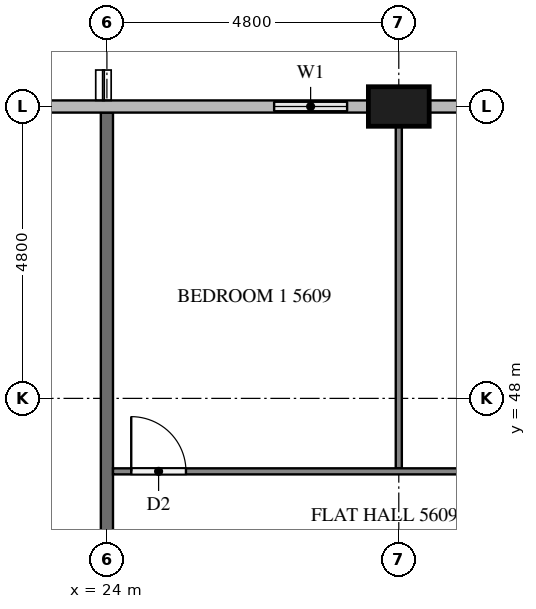
"""IFC4 building model, lengths in metres.
Left out: names, types, materials, properties, quantities, classifications, styles, units other than length and angle.
Written with IfcOpenShell. Run it as: python <this file> out.ifc"""

import sys

from ifc_helpers import new_model, si_unit, direction, frame, frame_2d, origin, origin_2d, place, context, subcontext, project, spatial, rectangle, extrude, element, fill, save


model = new_model("IFC4")
c1 = context("Model", 3, precision=1e-05, world=origin(), true_north=direction((0.0, 1.0)))
c2 = subcontext(c1, "Body", "Model", "MODEL_VIEW")
j1 = project(units=[si_unit("LENGTHUNIT", "METRE"), si_unit("PLANEANGLEUNIT", "RADIAN")], contexts=[c1])
p1 = place(None, origin())
s1 = spatial("IfcSite", under=j1, at=p1, CompositionType="ELEMENT")
p2 = place(p1, origin())
s2 = spatial("IfcBuilding", under=s1, at=p2, CompositionType="ELEMENT")
p3 = place(p2, frame((0.0, 0.0, 215.8)))
s3 = spatial("IfcBuildingStorey", under=s2, at=p3, CompositionType="ELEMENT", Elevation=215.8)
p4 = place(p3, frame((28.8, 52.8, 0.0), z_axis=(0.0, 0.0, 1.0), x_axis=(1.0, 0.0, 0.0)))
e1 = element("IfcColumn", 1, at=p4, inside=s3, PredefinedType="COLUMN", context=c2, shape_type="SweptSolid", body=[
    extrude(rectangle(XDim=1.0, YDim=0.65, at=origin_2d()), origin(), (0.0, 0.0, 1.0), 3.2),
])
p5 = place(p3, frame((28.3, 52.8, 0.0), z_axis=(0.0, 0.0, 1.0), x_axis=(-1.0, 0.0, 0.0)))
e2 = element("IfcWall", 2, at=p5, inside=s3, PredefinedType="SOLIDWALL", context=c2, shape_type="SweptSolid", body=[
    extrude(rectangle(XDim=1.9, YDim=0.15, at=frame_2d((0.95, 0.0))), origin(), (0.0, 0.0, 1.0), 3.2),
])
p6 = place(p5, frame((0.35, 0.0, 0.9)))
e3 = element("IfcOpeningElement", 3, at=p6, cuts=e2, PredefinedType="OPENING", context=c2, shape_type="SweptSolid", body=[
    extrude(rectangle(XDim=1.2, YDim=1.4, at=frame_2d((0.6, 0.7))), frame((0.0, 0.085, 0.0), z_axis=(0.0, -1.0, 0.0), x_axis=(1.0, 0.0, 0.0)), (0.0, 0.0, 1.0), 0.17),
])
p7 = place(p3, frame((24.0, 52.7, 0.0), z_axis=(0.0, 0.0, 1.0), x_axis=(0.0, -1.0, 0.0)))
e4 = element("IfcWall", 4, at=p7, inside=s3, PredefinedType="PARTITIONING", context=c2, shape_type="SweptSolid", body=[
    extrude(rectangle(XDim=11.8, YDim=0.2, at=frame_2d((5.9, 0.0))), origin(), (0.0, 0.0, 1.0), 3.2),
])
p8 = place(p3, frame((28.8, 46.85, 0.0), z_axis=(0.0, 0.0, 1.0), x_axis=(0.0, 1.0, 0.0)))
e5 = element("IfcWall", 5, at=p8, inside=s3, PredefinedType="PARTITIONING", context=c2, shape_type="SweptSolid", body=[
    extrude(rectangle(XDim=5.625, YDim=0.1, at=frame_2d((2.812, 0.0))), origin(), (0.0, 0.0, 1.0), 3.2),
])
p9 = place(p3, frame((24.1, 46.8, 0.0), z_axis=(0.0, 0.0, 1.0), x_axis=(1.0, 0.0, 0.0)))
e6 = element("IfcWall", 6, at=p9, inside=s3, PredefinedType="PARTITIONING", context=c2, shape_type="SweptSolid", body=[
    extrude(rectangle(XDim=16.6, YDim=0.1, at=frame_2d((8.3, 0.0))), origin(), (0.0, 0.0, 1.0), 3.2),
])
p10 = place(p9, frame((0.3, 0.0, 0.0)))
e7 = element("IfcOpeningElement", 7, at=p10, cuts=e6, PredefinedType="OPENING", context=c2, shape_type="SweptSolid", body=[
    extrude(rectangle(XDim=0.9, YDim=2.1, at=frame_2d((0.45, 1.05))), frame((0.0, 0.06, 0.0), z_axis=(0.0, -1.0, 0.0), x_axis=(1.0, 0.0, 0.0)), (0.0, 0.0, 1.0), 0.12),
])
p11 = place(p9, frame((10.55, 0.0, 0.0)))
e8 = element("IfcOpeningElement", 8, at=p11, cuts=e6, PredefinedType="OPENING", context=c2, shape_type="SweptSolid", body=[
    extrude(rectangle(XDim=1.0, YDim=2.1, at=frame_2d((0.5, 1.05))), frame((0.0, 0.06, 0.0), z_axis=(0.0, -1.0, 0.0), x_axis=(1.0, 0.0, 0.0)), (0.0, 0.0, 1.0), 0.12),
])
p12 = place(p9, frame((12.25, 0.0, 0.0)))
e9 = element("IfcOpeningElement", 9, at=p12, cuts=e6, PredefinedType="OPENING", context=c2, shape_type="SweptSolid", body=[
    extrude(rectangle(XDim=0.9, YDim=2.1, at=frame_2d((0.45, 1.05))), frame((0.0, 0.06, 0.0), z_axis=(0.0, -1.0, 0.0), x_axis=(1.0, 0.0, 0.0)), (0.0, 0.0, 1.0), 0.12),
])
p13 = place(p6, origin())
e10 = element("IfcWindow", 10, at=p13, inside=s3, PartitioningType="SINGLE_PANEL", PredefinedType="WINDOW", context=c2, shape_type="SweptSolid", body=[
    extrude(rectangle(XDim=1.2, YDim=1.4, at=frame_2d((0.6, 0.7))), frame((0.0, 0.03, 0.0), z_axis=(0.0, -1.0, 0.0), x_axis=(1.0, 0.0, 0.0)), (0.0, 0.0, 1.0), 0.06),
])
fill(e3, e10)
p14 = place(p10, origin())
e11 = element("IfcDoor", 11, at=p14, inside=s3, OperationType="SINGLE_SWING_LEFT", PredefinedType="DOOR", context=c2, shape_type="SweptSolid", body=[
    extrude(rectangle(XDim=0.9, YDim=2.1, at=frame_2d((0.45, 1.05))), frame((0.0, 0.025, 0.0), z_axis=(0.0, -1.0, 0.0), x_axis=(1.0, 0.0, 0.0)), (0.0, 0.0, 1.0), 0.05),
])
fill(e7, e11)
save(model, sys.argv[1])
